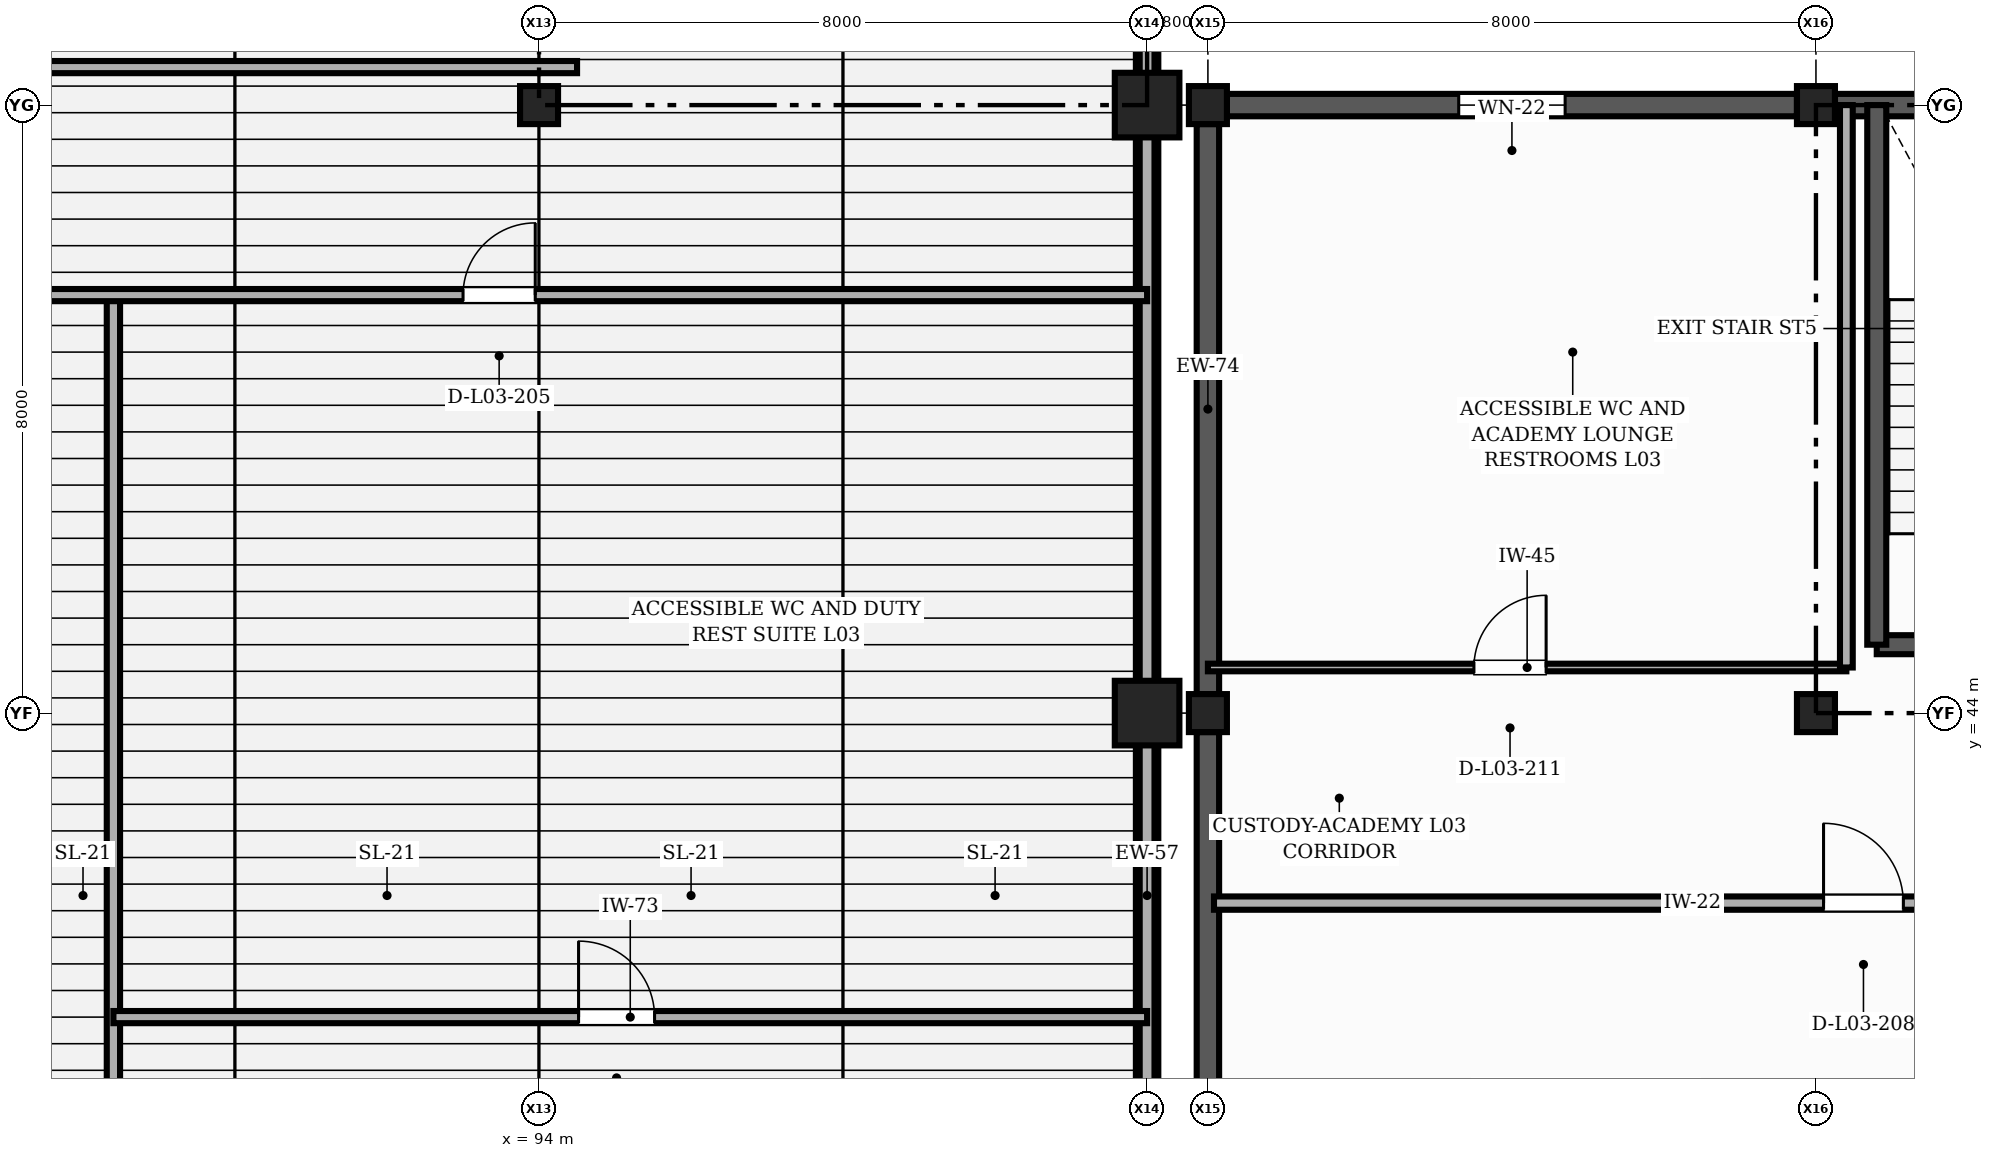
"""IFC4 building model, lengths in metres.
Left out: names, types, materials, properties, quantities, classifications, styles, units other than length and angle.
Written with IfcOpenShell. Run it as: python <this file> out.ifc"""

import sys

from ifc_helpers import new_model, si_unit, direction, frame, frame_2d, origin, origin_2d, place, context, subcontext, project, spatial, rectangle, extrude, element, fill, save


model = new_model("IFC4")
c1 = context("Model", 3, precision=1e-05, world=origin(), true_north=direction((0.0, 1.0)))
c2 = subcontext(c1, "Body", "Model", "MODEL_VIEW")
j1 = project(units=[si_unit("LENGTHUNIT", "METRE"), si_unit("PLANEANGLEUNIT", "RADIAN")], contexts=[c1])
p1 = place(None, origin())
s1 = spatial("IfcSite", under=j1, at=p1, CompositionType="ELEMENT")
p2 = place(p1, origin())
s2 = spatial("IfcBuilding", under=s1, at=p2, CompositionType="ELEMENT")
p3 = place(p2, frame((0.0, 0.0, 13.5)))
s3 = spatial("IfcBuildingStorey", under=s2, at=p3, CompositionType="ELEMENT", Elevation=13.5)
p4 = place(p3, frame((94.0, 52.0, 0.0), z_axis=(0.0, 0.0, 1.0), x_axis=(1.0, 0.0, 0.0)))
e1 = element("IfcColumn", 1, at=p4, inside=s3, PredefinedType="COLUMN", context=c2, shape_type="SweptSolid", body=[
    extrude(rectangle(XDim=0.5, YDim=0.5, at=origin_2d()), origin(), (0.0, 0.0, 1.0), 4.5),
])
for number, where, z_axis, x_axis in (
    (2, (102.0, 44.0, 0.0), (0.0, 0.0, 1.0), (1.0, 0.0, 0.0)),
    (3, (102.0, 52.0, 0.0), (0.0, 0.0, 1.0), (1.0, 0.0, 0.0)),
):
    element("IfcColumn", number, at=place(p3, frame(where, z_axis=z_axis, x_axis=x_axis)), inside=s3, PredefinedType="COLUMN", context=c2, shape_type="SweptSolid", body=[
        extrude(rectangle(XDim=0.85, YDim=0.85, at=origin_2d()), origin(), (0.0, 0.0, 1.0), 4.5),
    ])
for number, where, z_axis, x_axis in (
    (4, (102.8, 44.0, 0.0), (0.0, 0.0, 1.0), (1.0, 0.0, 0.0)),
    (5, (102.8, 52.0, 0.0), (0.0, 0.0, 1.0), (1.0, 0.0, 0.0)),
    (6, (110.8, 44.0, 0.0), (0.0, 0.0, 1.0), (1.0, 0.0, 0.0)),
    (7, (110.8, 52.0, 0.0), (0.0, 0.0, 1.0), (1.0, 0.0, 0.0)),
):
    element("IfcColumn", number, at=place(p3, frame(where, z_axis=z_axis, x_axis=x_axis)), inside=s3, PredefinedType="COLUMN", context=c2, shape_type="SweptSolid", body=[
        extrude(rectangle(XDim=0.5, YDim=0.5, at=origin_2d()), origin(), (0.0, 0.0, 1.0), 4.5),
    ])
for number, where, z_axis, x_axis in (
    (8, (102.0, 36.425, 0.0), (0.0, 0.0, 1.0), (0.0, 1.0, 0.0)),
    (9, (102.0, 44.425, 0.0), (0.0, 0.0, 1.0), (0.0, 1.0, 0.0)),
    (10, (102.0, 52.425, 0.0), (0.0, 0.0, 1.0), (0.0, 1.0, 0.0)),
):
    element("IfcWall", number, at=place(p3, frame(where, z_axis=z_axis, x_axis=x_axis)), inside=s3, PredefinedType="SOLIDWALL", context=c2, shape_type="SweptSolid", body=[
        extrude(rectangle(XDim=7.15, YDim=0.295, at=frame_2d((3.575, 0.0))), origin(), (0.0, 0.0, 1.0), 3.04),
    ])
p5 = place(p3, frame((118.55, 52.0, 0.0), z_axis=(0.0, 0.0, 1.0), x_axis=(-1.0, 0.0, 0.0)))
e11 = element("IfcWall", 11, at=p5, inside=s3, PredefinedType="SOLIDWALL", context=c2, shape_type="SweptSolid", body=[
    extrude(rectangle(XDim=7.5, YDim=0.295, at=frame_2d((3.75, 0.0))), origin(), (0.0, 0.0, 1.0), 4.19),
])
p6 = place(p3, frame((110.55, 52.0, 0.0), z_axis=(0.0, 0.0, 1.0), x_axis=(-1.0, 0.0, 0.0)))
e12 = element("IfcWall", 12, at=p6, inside=s3, PredefinedType="SOLIDWALL", context=c2, shape_type="SweptSolid", body=[
    extrude(rectangle(XDim=7.5, YDim=0.295, at=frame_2d((3.75, 0.0))), origin(), (0.0, 0.0, 1.0), 3.54),
])
p7 = place(p6, frame((3.05, 0.0, 0.9)))
e13 = element("IfcOpeningElement", 13, at=p7, cuts=e12, PredefinedType="OPENING", context=c2, shape_type="SweptSolid", body=[
    extrude(rectangle(XDim=1.4, YDim=1.4, at=frame_2d((0.7, 0.7))), frame((0.0, 0.157, 0.0), z_axis=(0.0, -1.0, 0.0), x_axis=(1.0, 0.0, 0.0)), (0.0, 0.0, 1.0), 0.315),
])
for number, where, z_axis, x_axis in (
    (14, (102.8, 51.75, 0.0), (0.0, 0.0, 1.0), (0.0, -1.0, 0.0)),
    (15, (102.8, 43.75, 0.0), (0.0, 0.0, 1.0), (0.0, -1.0, 0.0)),
):
    element("IfcWall", number, at=place(p3, frame(where, z_axis=z_axis, x_axis=x_axis)), inside=s3, PredefinedType="SOLIDWALL", context=c2, shape_type="SweptSolid", body=[
        extrude(rectangle(XDim=7.5, YDim=0.295, at=frame_2d((3.75, 0.0))), origin(), (0.0, 0.0, 1.0), 3.54),
    ])
p8 = place(p3, frame((102.0, 23.2, 4.5), z_axis=(0.0, 0.0, 1.0), x_axis=(0.0, 1.0, 0.0)))
e16 = element("IfcWall", 16, at=p8, inside=s3, PredefinedType="PARAPET", context=c2, shape_type="SweptSolid", body=[
    extrude(rectangle(XDim=36.8, YDim=0.195, at=frame_2d((18.4, 0.0))), origin(), (0.0, 0.0, 1.0), 0.85),
])
p9 = place(p3, frame((111.6, 44.9, 0.0), z_axis=(0.0, 0.0, 1.0), x_axis=(1.0, 0.0, 0.0)))
e17 = element("IfcWall", 17, at=p9, inside=s3, PredefinedType="SHEAR", context=c2, shape_type="SweptSolid", body=[
    extrude(rectangle(XDim=3.12, YDim=0.25, at=frame_2d((1.56, 0.0))), origin(), (0.0, 0.0, 1.0), 4.5),
])
p10 = place(p9, frame((0.985, 0.0, 0.0)))
e18 = element("IfcOpeningElement", 18, at=p10, cuts=e17, PredefinedType="OPENING", context=c2, shape_type="SweptSolid", body=[
    extrude(rectangle(XDim=1.15, YDim=2.15, at=frame_2d((0.575, 1.075))), frame((0.0, 0.135, 0.0), z_axis=(0.0, -1.0, 0.0), x_axis=(1.0, 0.0, 0.0)), (0.0, 0.0, 1.0), 0.27),
])
p11 = place(p3, frame((111.6, 52.0, 0.0), z_axis=(0.0, 0.0, 1.0), x_axis=(0.0, -1.0, 0.0)))
e19 = element("IfcWall", 19, at=p11, inside=s3, PredefinedType="SHEAR", context=c2, shape_type="SweptSolid", body=[
    extrude(rectangle(XDim=7.1, YDim=0.25, at=frame_2d((3.55, 0.0))), origin(), (0.0, 0.0, 1.0), 4.5),
])
p12 = place(p3, frame((88.4, 23.2, 0.0), z_axis=(0.0, 0.0, 1.0), x_axis=(0.0, 1.0, 0.0)))
e20 = element("IfcWall", 20, at=p12, inside=s3, PredefinedType="PARTITIONING", context=c2, shape_type="SweptSolid", body=[
    extrude(rectangle(XDim=26.3, YDim=0.175, at=frame_2d((13.15, 0.0))), origin(), (0.0, 0.0, 1.0), 3.16),
])
p13 = place(p12, frame((10.0, 0.0, 0.0)))
e21 = element("IfcOpeningElement", 21, at=p13, cuts=e20, PredefinedType="OPENING", context=c2, shape_type="SweptSolid", body=[
    extrude(rectangle(XDim=1.1, YDim=2.1, at=frame_2d((0.55, 1.05))), frame((0.0, 0.098, 0.0), z_axis=(0.0, -1.0, 0.0), x_axis=(1.0, 0.0, 0.0)), (0.0, 0.0, 1.0), 0.195),
])
p14 = place(p3, frame((88.4, 40.0, 0.0), z_axis=(0.0, 0.0, 1.0), x_axis=(1.0, 0.0, 0.0)))
e22 = element("IfcWall", 22, at=p14, inside=s3, PredefinedType="PARTITIONING", context=c2, shape_type="SweptSolid", body=[
    extrude(rectangle(XDim=13.6, YDim=0.16, at=frame_2d((6.8, 0.0))), origin(), (0.0, 0.0, 1.0), 3.025),
])
p15 = place(p14, frame((6.12, 0.0, 0.0)))
e23 = element("IfcOpeningElement", 23, at=p15, cuts=e22, PredefinedType="OPENING", context=c2, shape_type="SweptSolid", body=[
    extrude(rectangle(XDim=1.0, YDim=2.15, at=frame_2d((0.5, 1.075))), frame((0.0, 0.09, 0.0), z_axis=(0.0, -1.0, 0.0), x_axis=(1.0, 0.0, 0.0)), (0.0, 0.0, 1.0), 0.18),
])
p16 = place(p3, frame((46.0, 49.5, 0.0), z_axis=(0.0, 0.0, 1.0), x_axis=(1.0, 0.0, 0.0)))
e24 = element("IfcWall", 24, at=p16, inside=s3, PredefinedType="PARTITIONING", context=c2, shape_type="SweptSolid", body=[
    extrude(rectangle(XDim=56.0, YDim=0.16, at=frame_2d((28.0, 0.0))), origin(), (0.0, 0.0, 1.0), 2.785),
])
p17 = place(p16, frame((6.5, 0.0, 0.0)))
e25 = element("IfcOpeningElement", 25, at=p17, cuts=e24, PredefinedType="OPENING", context=c2, shape_type="SweptSolid", body=[
    extrude(rectangle(XDim=1.4, YDim=2.15, at=frame_2d((0.7, 1.075))), frame((0.0, 0.09, 0.0), z_axis=(0.0, -1.0, 0.0), x_axis=(1.0, 0.0, 0.0)), (0.0, 0.0, 1.0), 0.18),
])
p18 = place(p16, frame((28.0, 0.0, 0.0)))
e26 = element("IfcOpeningElement", 26, at=p18, cuts=e24, PredefinedType="OPENING", context=c2, shape_type="SweptSolid", body=[
    extrude(rectangle(XDim=1.4, YDim=2.15, at=frame_2d((0.7, 1.075))), frame((0.0, 0.09, 0.0), z_axis=(0.0, -1.0, 0.0), x_axis=(1.0, 0.0, 0.0)), (0.0, 0.0, 1.0), 0.18),
])
p19 = place(p16, frame((47.0, 0.0, 0.0)))
e27 = element("IfcOpeningElement", 27, at=p19, cuts=e24, PredefinedType="OPENING", context=c2, shape_type="SweptSolid", body=[
    extrude(rectangle(XDim=0.95, YDim=2.15, at=frame_2d((0.475, 1.075))), frame((0.0, 0.09, 0.0), z_axis=(0.0, -1.0, 0.0), x_axis=(1.0, 0.0, 0.0)), (0.0, 0.0, 1.0), 0.18),
])
p20 = place(p3, frame((53.5, 52.5, 0.0), z_axis=(0.0, 0.0, 1.0), x_axis=(1.0, 0.0, 0.0)))
e28 = element("IfcWall", 28, at=p20, inside=s3, PredefinedType="PARTITIONING", context=c2, shape_type="SweptSolid", body=[
    extrude(rectangle(XDim=41.0, YDim=0.16, at=frame_2d((20.5, 0.0))), origin(), (0.0, 0.0, 1.0), 2.785),
])
p21 = place(p20, frame((10.0, 0.0, 0.0)))
e29 = element("IfcOpeningElement", 29, at=p21, cuts=e28, PredefinedType="OPENING", context=c2, shape_type="SweptSolid", body=[
    extrude(rectangle(XDim=1.1, YDim=2.15, at=frame_2d((0.55, 1.075))), frame((0.0, 0.09, 0.0), z_axis=(0.0, -1.0, 0.0), x_axis=(1.0, 0.0, 0.0)), (0.0, 0.0, 1.0), 0.18),
])
p22 = place(p20, frame((30.0, 0.0, 0.0)))
e30 = element("IfcOpeningElement", 30, at=p22, cuts=e28, PredefinedType="OPENING", context=c2, shape_type="SweptSolid", body=[
    extrude(rectangle(XDim=1.1, YDim=2.1, at=frame_2d((0.55, 1.05))), frame((0.0, 0.09, 0.0), z_axis=(0.0, -1.0, 0.0), x_axis=(1.0, 0.0, 0.0)), (0.0, 0.0, 1.0), 0.18),
])
p23 = place(p3, frame((102.88, 41.5, 0.0), z_axis=(0.0, 0.0, 1.0), x_axis=(1.0, 0.0, 0.0)))
e31 = element("IfcWall", 31, at=p23, inside=s3, PredefinedType="PARTITIONING", context=c2, shape_type="SweptSolid", body=[
    extrude(rectangle(XDim=47.84, YDim=0.175, at=frame_2d((23.92, 0.0))), origin(), (0.0, 0.0, 1.0), 3.525),
])
p24 = place(p23, frame((8.02, 0.0, 0.0)))
e32 = element("IfcOpeningElement", 32, at=p24, cuts=e31, PredefinedType="OPENING", context=c2, shape_type="SweptSolid", body=[
    extrude(rectangle(XDim=1.05, YDim=2.1, at=frame_2d((0.525, 1.05))), frame((0.0, 0.098, 0.0), z_axis=(0.0, -1.0, 0.0), x_axis=(1.0, 0.0, 0.0)), (0.0, 0.0, 1.0), 0.195),
])
p25 = place(p23, frame((24.99, 0.0, 0.0)))
e33 = element("IfcOpeningElement", 33, at=p25, cuts=e31, PredefinedType="OPENING", context=c2, shape_type="SweptSolid", body=[
    extrude(rectangle(XDim=1.05, YDim=2.1, at=frame_2d((0.525, 1.05))), frame((0.0, 0.098, 0.0), z_axis=(0.0, -1.0, 0.0), x_axis=(1.0, 0.0, 0.0)), (0.0, 0.0, 1.0), 0.195),
])
p26 = place(p23, frame((40.27, 0.0, 0.0)))
e34 = element("IfcOpeningElement", 34, at=p26, cuts=e31, PredefinedType="OPENING", context=c2, shape_type="SweptSolid", body=[
    extrude(rectangle(XDim=1.05, YDim=2.1, at=frame_2d((0.525, 1.05))), frame((0.0, 0.098, 0.0), z_axis=(0.0, -1.0, 0.0), x_axis=(1.0, 0.0, 0.0)), (0.0, 0.0, 1.0), 0.195),
])
p27 = place(p3, frame((102.8, 44.6, 0.0), z_axis=(0.0, 0.0, 1.0), x_axis=(1.0, 0.0, 0.0)))
e35 = element("IfcWall", 35, at=p27, inside=s3, PredefinedType="PARTITIONING", context=c2, shape_type="SweptSolid", body=[
    extrude(rectangle(XDim=8.4, YDim=0.1, at=frame_2d((4.2, 0.0))), origin(), (0.0, 0.0, 1.0), 3.325),
])
p28 = place(p27, frame((3.5, 0.0, 0.0)))
e36 = element("IfcOpeningElement", 36, at=p28, cuts=e35, PredefinedType="OPENING", context=c2, shape_type="SweptSolid", body=[
    extrude(rectangle(XDim=0.95, YDim=2.15, at=frame_2d((0.475, 1.075))), frame((0.0, 0.06, 0.0), z_axis=(0.0, -1.0, 0.0), x_axis=(1.0, 0.0, 0.0)), (0.0, 0.0, 1.0), 0.12),
])
p29 = place(p3, frame((111.2, 44.6, 0.0), z_axis=(0.0, 0.0, 1.0), x_axis=(0.0, 1.0, 0.0)))
e37 = element("IfcWall", 37, at=p29, inside=s3, PredefinedType="PARTITIONING", context=c2, shape_type="SweptSolid", body=[
    extrude(rectangle(XDim=7.4, YDim=0.168, at=frame_2d((3.7, 0.0))), origin(), (0.0, 0.0, 1.0), 4.19),
])
p30 = place(p7, origin())
e38 = element("IfcWindow", 38, at=p30, inside=s3, PartitioningType="SINGLE_PANEL", PredefinedType="WINDOW", context=c2, shape_type="SweptSolid", body=[
    extrude(rectangle(XDim=1.4, YDim=1.4, at=frame_2d((0.7, 0.7))), frame((0.0, 0.03, 0.0), z_axis=(0.0, -1.0, 0.0), x_axis=(1.0, 0.0, 0.0)), (0.0, 0.0, 1.0), 0.06),
])
fill(e13, e38)
p31 = place(p15, origin())
e39 = element("IfcDoor", 39, at=p31, inside=s3, OperationType="SINGLE_SWING_LEFT", PredefinedType="DOOR", context=c2, shape_type="SweptSolid", body=[
    extrude(rectangle(XDim=1.0, YDim=2.15, at=frame_2d((0.5, 1.075))), frame((0.0, 0.025, 0.0), z_axis=(0.0, -1.0, 0.0), x_axis=(1.0, 0.0, 0.0)), (0.0, 0.0, 1.0), 0.05),
])
fill(e23, e39)
p32 = place(p19, origin())
e40 = element("IfcDoor", 40, at=p32, inside=s3, OperationType="SINGLE_SWING_RIGHT", PredefinedType="DOOR", context=c2, shape_type="SweptSolid", body=[
    extrude(rectangle(XDim=0.95, YDim=2.15, at=frame_2d((0.475, 1.075))), frame((0.0, 0.025, 0.0), z_axis=(0.0, -1.0, 0.0), x_axis=(1.0, 0.0, 0.0)), (0.0, 0.0, 1.0), 0.05),
])
fill(e27, e40)
p33 = place(p24, origin())
e41 = element("IfcDoor", 41, at=p33, inside=s3, OperationType="SINGLE_SWING_LEFT", PredefinedType="DOOR", context=c2, shape_type="SweptSolid", body=[
    extrude(rectangle(XDim=1.05, YDim=2.1, at=frame_2d((0.525, 1.05))), frame((0.0, 0.025, 0.0), z_axis=(0.0, -1.0, 0.0), x_axis=(1.0, 0.0, 0.0)), (0.0, 0.0, 1.0), 0.05),
])
fill(e32, e41)
p34 = place(p28, origin())
e42 = element("IfcDoor", 42, at=p34, inside=s3, OperationType="SINGLE_SWING_RIGHT", PredefinedType="DOOR", context=c2, shape_type="SweptSolid", body=[
    extrude(rectangle(XDim=0.95, YDim=2.15, at=frame_2d((0.475, 1.075))), frame((0.0, 0.025, 0.0), z_axis=(0.0, -1.0, 0.0), x_axis=(1.0, 0.0, 0.0)), (0.0, 0.0, 1.0), 0.05),
])
fill(e36, e42)
save(model, sys.argv[1])
